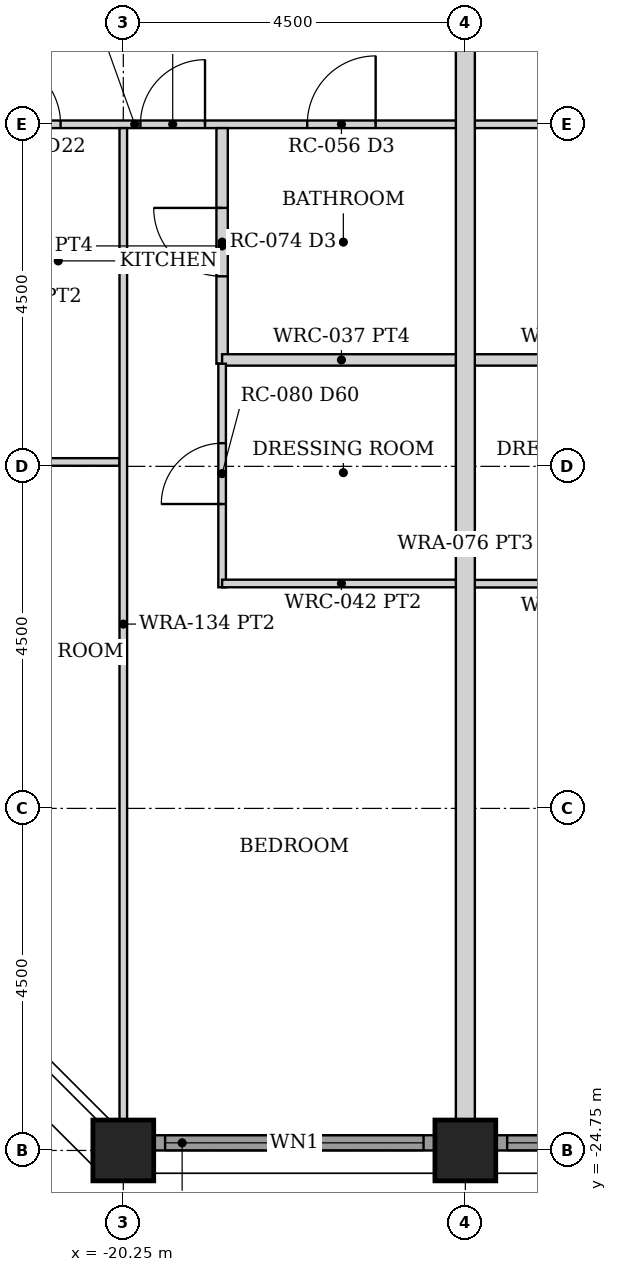
"""IFC4 building model, lengths in metres.
Left out: names, types, materials, properties, quantities, classifications, styles, units other than length and angle.
Written with IfcOpenShell. Run it as: python <this file> out.ifc"""

import sys

from ifc_helpers import new_model, si_unit, direction, frame, frame_2d, origin, origin_2d, place, context, subcontext, project, spatial, rectangle, hollow_rectangle, extrude, element, fill, save


model = new_model("IFC4")
c1 = context("Model", 3, precision=1e-05, world=origin(), true_north=direction((0.0, 1.0)))
c2 = subcontext(c1, "Body", "Model", "MODEL_VIEW")
j1 = project(units=[si_unit("LENGTHUNIT", "METRE"), si_unit("PLANEANGLEUNIT", "RADIAN")], contexts=[c1])
p1 = place(None, origin())
s1 = spatial("IfcSite", under=j1, at=p1, CompositionType="ELEMENT")
p2 = place(p1, origin())
s2 = spatial("IfcBuilding", under=s1, at=p2, CompositionType="ELEMENT")
p3 = place(p2, frame((0.0, 0.0, 47.5)))
s3 = spatial("IfcBuildingStorey", under=s2, at=p3, CompositionType="ELEMENT", Elevation=47.5)
for number, where, z_axis, x_axis in (
    (1, (-20.25, -24.75, 0.0), (0.0, 0.0, 1.0), (0.0, 1.0, 0.0)),
    (2, (-15.75, -24.75, 0.0), (0.0, 0.0, 1.0), (0.0, 1.0, 0.0)),
):
    element("IfcColumn", number, at=place(p3, frame(where, z_axis=z_axis, x_axis=x_axis)), inside=s3, PredefinedType="COLUMN", context=c2, shape_type="SweptSolid", body=[
        extrude(hollow_rectangle(XDim=0.8, YDim=0.8, WallThickness=0.07, at=origin_2d()), origin(), (0.0, 0.0, 1.0), 3.5),
    ])
p4 = place(p3, frame((-19.845, -24.65, 0.0), z_axis=(0.0, 0.0, 1.0), x_axis=(1.0, 0.0, 0.0)))
e3 = element("IfcWall", 3, at=p4, inside=s3, PredefinedType="SOLIDWALL", context=c2, shape_type="SweptSolid", body=[
    extrude(rectangle(XDim=3.69, YDim=0.2, at=frame_2d((1.845, 0.0))), origin(), (0.0, 0.0, 1.0), 2.379),
])
p5 = place(p4, frame((0.145, 0.0, 0.3)))
e4 = element("IfcOpeningElement", 4, at=p5, cuts=e3, PredefinedType="OPENING", context=c2, shape_type="SweptSolid", body=[
    extrude(rectangle(XDim=3.4, YDim=1.929, at=frame_2d((1.7, 0.964))), frame((0.0, 0.11, 0.0), z_axis=(0.0, -1.0, 0.0), x_axis=(1.0, 0.0, 0.0)), (0.0, 0.0, 1.0), 0.22),
])
p6 = place(p3, frame((-15.345, -24.65, 0.0), z_axis=(0.0, 0.0, 1.0), x_axis=(1.0, 0.0, 0.0)))
e5 = element("IfcWall", 5, at=p6, inside=s3, PredefinedType="SOLIDWALL", context=c2, shape_type="SweptSolid", body=[
    extrude(rectangle(XDim=3.69, YDim=0.2, at=frame_2d((1.845, 0.0))), origin(), (0.0, 0.0, 1.0), 2.379),
])
p7 = place(p6, frame((0.145, 0.0, 0.3)))
e6 = element("IfcOpeningElement", 6, at=p7, cuts=e5, PredefinedType="OPENING", context=c2, shape_type="SweptSolid", body=[
    extrude(rectangle(XDim=3.4, YDim=1.929, at=frame_2d((1.7, 0.964))), frame((0.0, 0.11, 0.0), z_axis=(0.0, -1.0, 0.0), x_axis=(1.0, 0.0, 0.0)), (0.0, 0.0, 1.0), 0.22),
])
p8 = place(p3, frame((-24.35, -11.25, 0.0), z_axis=(0.0, 0.0, 1.0), x_axis=(1.0, 0.0, 0.0)))
e7 = element("IfcWall", 7, at=p8, inside=s3, PredefinedType="PARTITIONING", context=c2, shape_type="SweptSolid", body=[
    extrude(rectangle(XDim=8.5, YDim=0.1, at=frame_2d((4.25, 0.0))), origin(), (0.0, 0.0, 1.0), 2.373),
])
p9 = place(p8, frame((2.375, 0.0, 0.0)))
e8 = element("IfcOpeningElement", 8, at=p9, cuts=e7, PredefinedType="OPENING", context=c2, shape_type="SweptSolid", body=[
    extrude(rectangle(XDim=0.9, YDim=2.1, at=frame_2d((0.45, 1.05))), frame((0.0, 0.06, 0.0), z_axis=(0.0, -1.0, 0.0), x_axis=(1.0, 0.0, 0.0)), (0.0, 0.0, 1.0), 0.12),
])
p10 = place(p8, frame((0.35, 0.0, 0.0)))
e9 = element("IfcOpeningElement", 9, at=p10, cuts=e7, PredefinedType="OPENING", context=c2, shape_type="SweptSolid", body=[
    extrude(rectangle(XDim=0.9, YDim=2.1, at=frame_2d((0.45, 1.05))), frame((0.0, 0.06, 0.0), z_axis=(0.0, -1.0, 0.0), x_axis=(1.0, 0.0, 0.0)), (0.0, 0.0, 1.0), 0.12),
])
p11 = place(p8, frame((4.325, 0.0, 0.0)))
e10 = element("IfcOpeningElement", 10, at=p11, cuts=e7, PredefinedType="OPENING", context=c2, shape_type="SweptSolid", body=[
    extrude(rectangle(XDim=0.85, YDim=2.1, at=frame_2d((0.425, 1.05))), frame((0.0, 0.06, 0.0), z_axis=(0.0, -1.0, 0.0), x_axis=(1.0, 0.0, 0.0)), (0.0, 0.0, 1.0), 0.12),
])
p12 = place(p8, frame((6.52, 0.0, 0.0)))
e11 = element("IfcOpeningElement", 11, at=p12, cuts=e7, PredefinedType="OPENING", context=c2, shape_type="SweptSolid", body=[
    extrude(rectangle(XDim=0.9, YDim=2.1, at=frame_2d((0.45, 1.05))), frame((0.0, 0.06, 0.0), z_axis=(0.0, -1.0, 0.0), x_axis=(1.0, 0.0, 0.0)), (0.0, 0.0, 1.0), 0.12),
])
p13 = place(p3, frame((-22.8, -15.692, 0.0), z_axis=(0.0, 0.0, 1.0), x_axis=(1.0, 0.0, 0.0)))
e12 = element("IfcWall", 12, at=p13, inside=s3, PredefinedType="PARTITIONING", context=c2, shape_type="SweptSolid", body=[
    extrude(rectangle(XDim=2.5, YDim=0.1, at=frame_2d((1.25, 0.0))), origin(), (0.0, 0.0, 1.0), 2.373),
])
p14 = place(p3, frame((-20.25, -24.35, 0.0), z_axis=(0.0, 0.0, 1.0), x_axis=(0.0, 1.0, 0.0)))
e13 = element("IfcWall", 13, at=p14, inside=s3, PredefinedType="PARTITIONING", context=c2, shape_type="SweptSolid", body=[
    extrude(rectangle(XDim=13.05, YDim=0.1, at=frame_2d((6.525, 0.0))), origin(), (0.0, 0.0, 1.0), 2.373),
])
p15 = place(p3, frame((-18.95, -14.4, 0.0), z_axis=(0.0, 0.0, 1.0), x_axis=(0.0, 1.0, 0.0)))
e14 = element("IfcWall", 14, at=p15, inside=s3, PredefinedType="PARTITIONING", context=c2, shape_type="SweptSolid", body=[
    extrude(rectangle(XDim=3.1, YDim=0.15, at=frame_2d((1.55, 0.0))), origin(), (0.0, 0.0, 1.0), 2.373),
])
p16 = place(p15, frame((1.15, 0.0, 0.0)))
e15 = element("IfcOpeningElement", 15, at=p16, cuts=e14, PredefinedType="OPENING", context=c2, shape_type="SweptSolid", body=[
    extrude(rectangle(XDim=0.9, YDim=2.1, at=frame_2d((0.45, 1.05))), frame((0.0, 0.085, 0.0), z_axis=(0.0, -1.0, 0.0), x_axis=(1.0, 0.0, 0.0)), (0.0, 0.0, 1.0), 0.17),
])
p17 = place(p3, frame((-18.95, -14.35, 0.0), z_axis=(0.0, 0.0, 1.0), x_axis=(1.0, 0.0, 0.0)))
e16 = element("IfcWall", 16, at=p17, inside=s3, PredefinedType="PARTITIONING", context=c2, shape_type="SweptSolid", body=[
    extrude(rectangle(XDim=3.14, YDim=0.15, at=frame_2d((1.57, 0.0))), origin(), (0.0, 0.0, 1.0), 2.373),
])
p18 = place(p3, frame((-18.95, -17.341, 0.0), z_axis=(0.0, 0.0, 1.0), x_axis=(0.0, 1.0, 0.0)))
e17 = element("IfcWall", 17, at=p18, inside=s3, PredefinedType="PARTITIONING", context=c2, shape_type="SweptSolid", body=[
    extrude(rectangle(XDim=2.941, YDim=0.1, at=frame_2d((1.47, 0.0))), origin(), (0.0, 0.0, 1.0), 2.373),
])
p19 = place(p18, frame((1.095, 0.0, 0.0)))
e18 = element("IfcOpeningElement", 18, at=p19, cuts=e17, PredefinedType="OPENING", context=c2, shape_type="SweptSolid", body=[
    extrude(rectangle(XDim=0.8, YDim=2.1, at=frame_2d((0.4, 1.05))), frame((0.0, 0.06, 0.0), z_axis=(0.0, -1.0, 0.0), x_axis=(1.0, 0.0, 0.0)), (0.0, 0.0, 1.0), 0.12),
])
p20 = place(p3, frame((-18.95, -17.291, 0.0), z_axis=(0.0, 0.0, 1.0), x_axis=(1.0, 0.0, 0.0)))
e19 = element("IfcWall", 19, at=p20, inside=s3, PredefinedType="PARTITIONING", context=c2, shape_type="SweptSolid", body=[
    extrude(rectangle(XDim=3.14, YDim=0.1, at=frame_2d((1.57, 0.0))), origin(), (0.0, 0.0, 1.0), 2.373),
])
p21 = place(p3, frame((-15.65, -11.25, 0.0), z_axis=(0.0, 0.0, 1.0), x_axis=(1.0, 0.0, 0.0)))
e20 = element("IfcWall", 20, at=p21, inside=s3, PredefinedType="PARTITIONING", context=c2, shape_type="SweptSolid", body=[
    extrude(rectangle(XDim=8.8, YDim=0.1, at=frame_2d((4.4, 0.0))), origin(), (0.0, 0.0, 1.0), 2.373),
])
p22 = place(p21, frame((5.35, 0.0, 0.0)))
e21 = element("IfcOpeningElement", 21, at=p22, cuts=e20, PredefinedType="OPENING", context=c2, shape_type="SweptSolid", body=[
    extrude(rectangle(XDim=0.9, YDim=2.1, at=frame_2d((0.45, 1.05))), frame((0.0, 0.06, 0.0), z_axis=(0.0, -1.0, 0.0), x_axis=(1.0, 0.0, 0.0)), (0.0, 0.0, 1.0), 0.12),
])
p23 = place(p21, frame((7.6, 0.0, 0.0)))
e22 = element("IfcOpeningElement", 22, at=p23, cuts=e20, PredefinedType="OPENING", context=c2, shape_type="SweptSolid", body=[
    extrude(rectangle(XDim=0.9, YDim=2.1, at=frame_2d((0.45, 1.05))), frame((0.0, 0.06, 0.0), z_axis=(0.0, -1.0, 0.0), x_axis=(1.0, 0.0, 0.0)), (0.0, 0.0, 1.0), 0.12),
])
p24 = place(p21, frame((3.325, 0.0, 0.0)))
e23 = element("IfcOpeningElement", 23, at=p24, cuts=e20, PredefinedType="OPENING", context=c2, shape_type="SweptSolid", body=[
    extrude(rectangle(XDim=0.85, YDim=2.1, at=frame_2d((0.425, 1.05))), frame((0.0, 0.06, 0.0), z_axis=(0.0, -1.0, 0.0), x_axis=(1.0, 0.0, 0.0)), (0.0, 0.0, 1.0), 0.12),
])
p25 = place(p21, frame((1.08, 0.0, 0.0)))
e24 = element("IfcOpeningElement", 24, at=p25, cuts=e20, PredefinedType="OPENING", context=c2, shape_type="SweptSolid", body=[
    extrude(rectangle(XDim=0.9, YDim=2.1, at=frame_2d((0.45, 1.05))), frame((0.0, 0.06, 0.0), z_axis=(0.0, -1.0, 0.0), x_axis=(1.0, 0.0, 0.0)), (0.0, 0.0, 1.0), 0.12),
])
p26 = place(p3, frame((-15.69, -14.35, 0.0), z_axis=(0.0, 0.0, 1.0), x_axis=(1.0, 0.0, 0.0)))
e25 = element("IfcWall", 25, at=p26, inside=s3, PredefinedType="PARTITIONING", context=c2, shape_type="SweptSolid", body=[
    extrude(rectangle(XDim=3.14, YDim=0.15, at=frame_2d((1.57, 0.0))), origin(), (0.0, 0.0, 1.0), 2.373),
])
p27 = place(p3, frame((-15.69, -17.293, 0.0), z_axis=(0.0, 0.0, 1.0), x_axis=(1.0, 0.0, 0.0)))
e26 = element("IfcWall", 26, at=p27, inside=s3, PredefinedType="PARTITIONING", context=c2, shape_type="SweptSolid", body=[
    extrude(rectangle(XDim=3.14, YDim=0.1, at=frame_2d((1.57, 0.0))), origin(), (0.0, 0.0, 1.0), 2.373),
])
p28 = place(p3, frame((-15.75, -24.35, 0.0), z_axis=(0.0, 0.0, 1.0), x_axis=(0.0, 1.0, 0.0)))
e27 = element("IfcWall", 27, at=p28, inside=s3, PredefinedType="PARTITIONING", context=c2, shape_type="SweptSolid", body=[
    extrude(rectangle(XDim=15.15, YDim=0.25, at=frame_2d((7.575, 0.0))), origin(), (0.0, 0.0, 1.0), 2.373),
])
p29 = place(p5, origin())
e28 = element("IfcWindow", 28, at=p29, inside=s3, PartitioningType="SINGLE_PANEL", PredefinedType="WINDOW", context=c2, shape_type="SweptSolid", body=[
    extrude(rectangle(XDim=3.4, YDim=1.929, at=frame_2d((1.7, 0.964))), frame((0.0, 0.03, 0.0), z_axis=(0.0, -1.0, 0.0), x_axis=(1.0, 0.0, 0.0)), (0.0, 0.0, 1.0), 0.06),
])
fill(e4, e28)
p30 = place(p7, origin())
e29 = element("IfcWindow", 29, at=p30, inside=s3, PartitioningType="SINGLE_PANEL", PredefinedType="WINDOW", context=c2, shape_type="SweptSolid", body=[
    extrude(rectangle(XDim=3.4, YDim=1.929, at=frame_2d((1.7, 0.964))), frame((0.0, 0.03, 0.0), z_axis=(0.0, -1.0, 0.0), x_axis=(1.0, 0.0, 0.0)), (0.0, 0.0, 1.0), 0.06),
])
fill(e6, e29)
p31 = place(p9, origin())
e30 = element("IfcDoor", 30, at=p31, inside=s3, OperationType="SINGLE_SWING_LEFT", PredefinedType="DOOR", context=c2, shape_type="SweptSolid", body=[
    extrude(rectangle(XDim=0.9, YDim=2.1, at=frame_2d((0.45, 1.05))), frame((0.0, 0.025, 0.0), z_axis=(0.0, -1.0, 0.0), x_axis=(1.0, 0.0, 0.0)), (0.0, 0.0, 1.0), 0.05),
])
fill(e8, e30)
p32 = place(p11, origin())
e31 = element("IfcDoor", 31, at=p32, inside=s3, OperationType="SINGLE_SWING_RIGHT", PredefinedType="DOOR", context=c2, shape_type="SweptSolid", body=[
    extrude(rectangle(XDim=0.85, YDim=2.1, at=frame_2d((0.425, 1.05))), frame((0.0, 0.025, 0.0), z_axis=(0.0, -1.0, 0.0), x_axis=(1.0, 0.0, 0.0)), (0.0, 0.0, 1.0), 0.05),
])
fill(e10, e31)
p33 = place(p16, origin())
e32 = element("IfcDoor", 32, at=p33, inside=s3, OperationType="SINGLE_SWING_RIGHT", PredefinedType="DOOR", context=c2, shape_type="SweptSolid", body=[
    extrude(rectangle(XDim=0.9, YDim=2.1, at=frame_2d((0.45, 1.05))), frame((0.0, 0.025, 0.0), z_axis=(0.0, -1.0, 0.0), x_axis=(1.0, 0.0, 0.0)), (0.0, 0.0, 1.0), 0.05),
])
fill(e15, e32)
p34 = place(p12, origin())
e33 = element("IfcDoor", 33, at=p34, inside=s3, OperationType="SINGLE_SWING_RIGHT", PredefinedType="DOOR", context=c2, shape_type="SweptSolid", body=[
    extrude(rectangle(XDim=0.9, YDim=2.1, at=frame_2d((0.45, 1.05))), frame((0.0, 0.025, 0.0), z_axis=(0.0, -1.0, 0.0), x_axis=(1.0, 0.0, 0.0)), (0.0, 0.0, 1.0), 0.05),
])
fill(e11, e33)
p35 = place(p19, origin())
e34 = element("IfcDoor", 34, at=p35, inside=s3, OperationType="SINGLE_SWING_LEFT", PredefinedType="DOOR", context=c2, shape_type="SweptSolid", body=[
    extrude(rectangle(XDim=0.8, YDim=2.1, at=frame_2d((0.4, 1.05))), frame((0.0, 0.025, 0.0), z_axis=(0.0, -1.0, 0.0), x_axis=(1.0, 0.0, 0.0)), (0.0, 0.0, 1.0), 0.05),
])
fill(e18, e34)
save(model, sys.argv[1])
